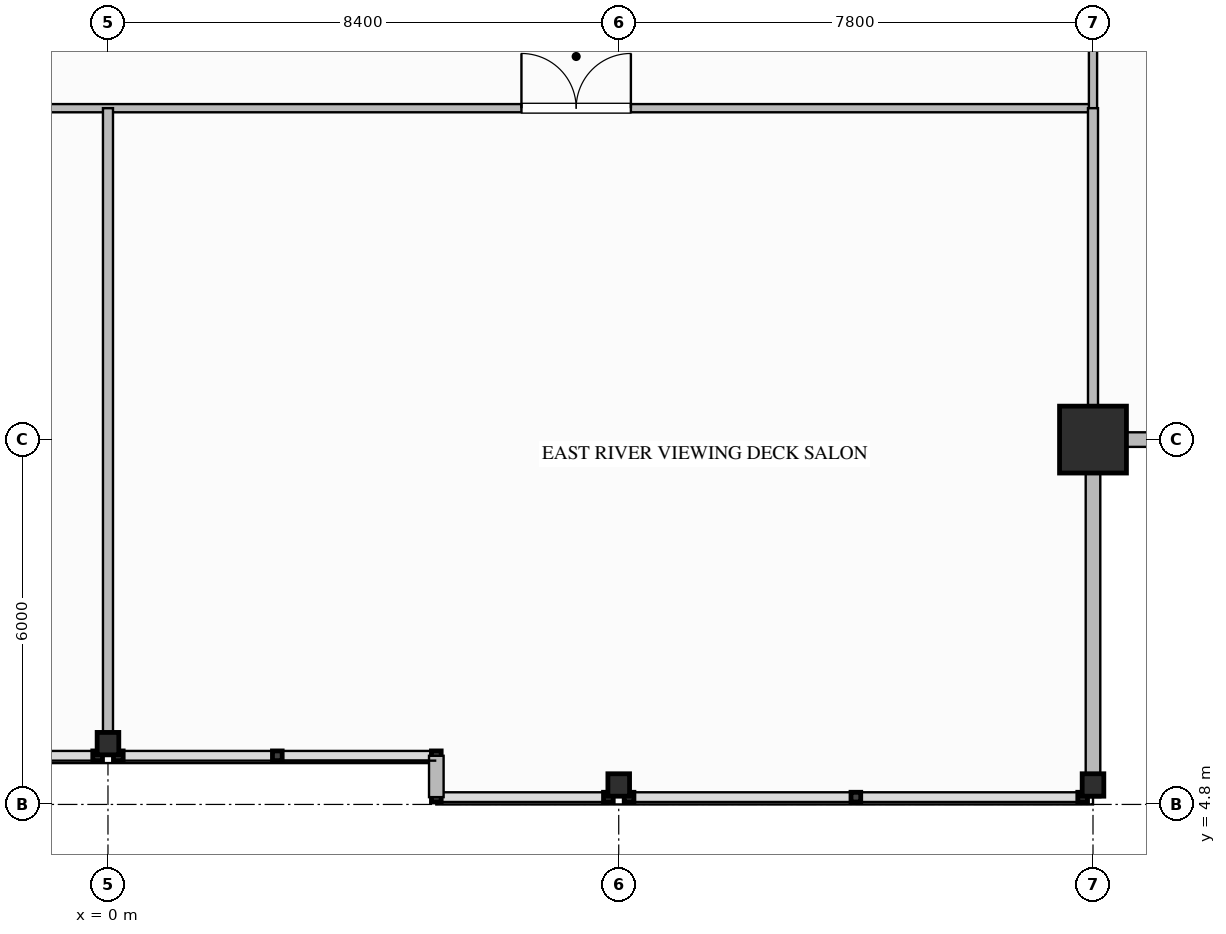
"""IFC4 building model, lengths in metres.
Left out: names, types, materials, properties, quantities, classifications, styles, units other than length and angle.
Written with IfcOpenShell. Run it as: python <this file> out.ifc"""

import sys

from ifc_helpers import new_model, si_unit, direction, frame, frame_2d, origin, origin_2d, place, context, subcontext, project, spatial, rectangle, i_section, extrude, element, fill, save


model = new_model("IFC4")
c1 = context("Model", 3, precision=1e-05, world=origin(), true_north=direction((0.0, 1.0)))
c2 = subcontext(c1, "Body", "Model", "MODEL_VIEW")
j1 = project(units=[si_unit("LENGTHUNIT", "METRE"), si_unit("PLANEANGLEUNIT", "RADIAN")], contexts=[c1])
p1 = place(None, origin())
s1 = spatial("IfcSite", under=j1, at=p1, CompositionType="ELEMENT")
p2 = place(p1, origin())
s2 = spatial("IfcBuilding", under=s1, at=p2, CompositionType="ELEMENT")
p3 = place(p2, frame((0.0, 0.0, 294.2)))
s3 = spatial("IfcBuildingStorey", under=s2, at=p3, CompositionType="ELEMENT", Elevation=294.2)
p4 = place(p3, frame((16.2, 10.8, 0.0), z_axis=(0.0, 0.0, 1.0), x_axis=(1.0, 0.0, 0.0)))
e1 = element("IfcColumn", 1, at=p4, inside=s3, PredefinedType="COLUMN", context=c2, shape_type="SweptSolid", body=[
    extrude(rectangle(XDim=1.1, YDim=1.1, at=origin_2d()), origin(), (0.0, 0.0, 1.0), 4.4),
])
for number, where, z_axis, x_axis in (
    (2, (0.0, 5.8, 0.0), (0.0, 0.0, 1.0), (0.0, 1.0, 0.0)),
    (3, (8.4, 5.12, 0.0), (0.0, 0.0, 1.0), (0.0, 1.0, 0.0)),
    (4, (16.2, 5.12, 0.0), (0.0, 0.0, 1.0), (0.0, 1.0, 0.0)),
):
    element("IfcColumn", number, at=place(p3, frame(where, z_axis=z_axis, x_axis=x_axis)), inside=s3, PredefinedType="COLUMN", context=c2, shape_type="SweptSolid", body=[
        extrude(i_section(OverallWidth=0.369, OverallDepth=0.356, WebThickness=0.011, FlangeThickness=0.018, FilletRadius=0.025, at=origin_2d()), origin(), (0.0, 0.0, 1.0), 4.397),
    ])
for number, where, z_axis, x_axis in (
    (5, (22.08, 10.8, 0.0), (0.0, 0.0, 1.0), (-1.0, 0.0, 0.0)),
    (6, (16.2, 10.8, 0.0), (0.0, 0.0, 1.0), (0.0, -1.0, 0.0)),
):
    element("IfcWall", number, at=place(p3, frame(where, z_axis=z_axis, x_axis=x_axis)), inside=s3, PredefinedType="STANDARD", context=c2, shape_type="SweptSolid", body=[
        extrude(rectangle(XDim=5.88, YDim=0.24, at=frame_2d((2.94, 0.0))), origin(), (0.0, 0.0, 1.0), 3.489),
    ])
p5 = place(p3, frame((5.4, 4.92, 0.0), z_axis=(0.0, 0.0, 1.0), x_axis=(0.0, 1.0, 0.0)))
e7 = element("IfcWall", 7, at=p5, inside=s3, PredefinedType="STANDARD", context=c2, shape_type="SweptSolid", body=[
    extrude(rectangle(XDim=0.68, YDim=0.24, at=frame_2d((0.34, 0.0))), origin(), (0.0, 0.0, 1.0), 4.1),
])
p6 = place(p3, frame((-16.2, 16.25, 0.0), z_axis=(0.0, 0.0, 1.0), x_axis=(1.0, 0.0, 0.0)))
e8 = element("IfcWall", 8, at=p6, inside=s3, PredefinedType="PARTITIONING", context=c2, shape_type="SweptSolid", body=[
    extrude(rectangle(XDim=32.4, YDim=0.135, at=frame_2d((16.2, 0.0))), origin(), (0.0, 0.0, 1.0), 4.1),
])
p7 = place(p6, frame((5.0, 0.0, 0.0)))
e9 = element("IfcOpeningElement", 9, at=p7, cuts=e8, PredefinedType="OPENING", context=c2, shape_type="SweptSolid", body=[
    extrude(rectangle(XDim=1.8, YDim=2.35, at=frame_2d((0.9, 1.175))), frame((0.0, 0.077, 0.0), z_axis=(0.0, -1.0, 0.0), x_axis=(1.0, 0.0, 0.0)), (0.0, 0.0, 1.0), 0.155),
])
p8 = place(p6, frame((23.0, 0.0, 0.0)))
e10 = element("IfcOpeningElement", 10, at=p8, cuts=e8, PredefinedType="OPENING", context=c2, shape_type="SweptSolid", body=[
    extrude(rectangle(XDim=1.8, YDim=2.35, at=frame_2d((0.9, 1.175))), frame((0.0, 0.077, 0.0), z_axis=(0.0, -1.0, 0.0), x_axis=(1.0, 0.0, 0.0)), (0.0, 0.0, 1.0), 0.155),
])
p9 = place(p3, frame((16.2, 16.25, 0.0), z_axis=(0.0, 0.0, 1.0), x_axis=(0.0, 1.0, 0.0)))
e11 = element("IfcWall", 11, at=p9, inside=s3, PredefinedType="PARTITIONING", context=c2, shape_type="SweptSolid", body=[
    extrude(rectangle(XDim=2.15, YDim=0.135, at=frame_2d((1.075, 0.0))), origin(), (0.0, 0.0, 1.0), 3.474),
])
p10 = place(p3, frame((16.2, 10.92, 0.0), z_axis=(0.0, 0.0, 1.0), x_axis=(0.0, 1.0, 0.0)))
e12 = element("IfcWall", 12, at=p10, inside=s3, PredefinedType="PARTITIONING", context=c2, shape_type="SweptSolid", body=[
    extrude(rectangle(XDim=5.33, YDim=0.165, at=frame_2d((2.665, 0.0))), origin(), (0.0, 0.0, 1.0), 3.474),
])
p11 = place(p3, frame((0.0, 5.6, 0.0), z_axis=(0.0, 0.0, 1.0), x_axis=(0.0, 1.0, 0.0)))
e13 = element("IfcWall", 13, at=p11, inside=s3, PredefinedType="PARTITIONING", context=c2, shape_type="SweptSolid", body=[
    extrude(rectangle(XDim=10.65, YDim=0.165, at=frame_2d((5.325, 0.0))), origin(), (0.0, 0.0, 1.0), 3.474),
])
p12 = place(p8, origin())
e14 = element("IfcDoor", 14, at=p12, inside=s3, OperationType="DOUBLE_DOOR_SINGLE_SWING", PredefinedType="DOOR", context=c2, shape_type="SweptSolid", body=[
    extrude(rectangle(XDim=1.8, YDim=2.35, at=frame_2d((0.9, 1.175))), frame((0.0, 0.025, 0.0), z_axis=(0.0, -1.0, 0.0), x_axis=(1.0, 0.0, 0.0)), (0.0, 0.0, 1.0), 0.05),
])
fill(e10, e14)
save(model, sys.argv[1])
